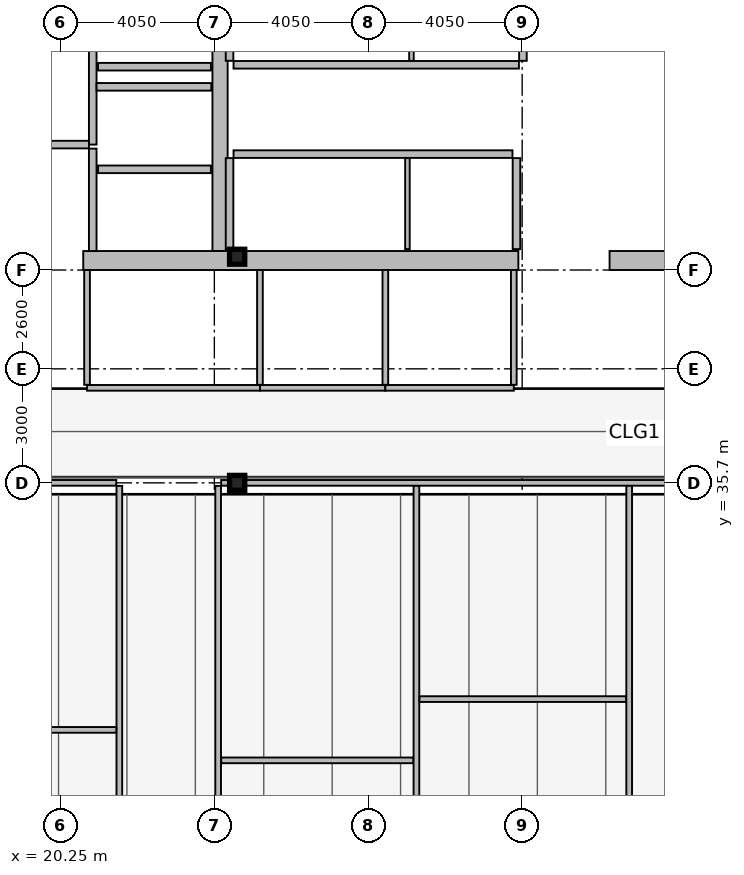
"""IFC4 building model, lengths in metres.
Left out: names, types, materials, properties, quantities, classifications, styles, units other than length and angle.
Written with IfcOpenShell. Run it as: python <this file> out.ifc"""

import sys

from ifc_helpers import new_model, si_unit, direction, frame, frame_2d, origin, origin_2d, place, context, subcontext, project, spatial, rectangle, i_section, extrude, element, fill, save


model = new_model("IFC4")
c1 = context("Model", 3, precision=1e-05, world=origin(), true_north=direction((0.0, 1.0)))
c2 = subcontext(c1, "Body", "Model", "MODEL_VIEW")
j1 = project(units=[si_unit("LENGTHUNIT", "METRE"), si_unit("PLANEANGLEUNIT", "RADIAN")], contexts=[c1])
p1 = place(None, origin())
s1 = spatial("IfcSite", under=j1, at=p1, CompositionType="ELEMENT")
p2 = place(p1, origin())
s2 = spatial("IfcBuilding", under=s1, at=p2, CompositionType="ELEMENT")
p3 = place(p2, frame((0.0, 0.0, 329.0)))
s3 = spatial("IfcBuildingStorey", under=s2, at=p3, CompositionType="ELEMENT", Elevation=329.0)
p4 = place(p3, frame((24.45, 41.8, 0.0), z_axis=(0.0, 0.0, 1.0), x_axis=(0.0, 1.0, 0.0)))
e1 = element("IfcWall", 1, at=p4, inside=s3, PredefinedType="SHEAR", context=c2, shape_type="SweptSolid", body=[
    extrude(rectangle(XDim=11.4, YDim=0.4, at=frame_2d((5.7, 0.0))), origin(), (0.0, 0.0, 1.0), 3.44),
])
p5 = place(p3, frame((32.3, 41.55, 0.0), z_axis=(0.0, 0.0, 1.0), x_axis=(-1.0, 0.0, 0.0)))
e2 = element("IfcWall", 2, at=p5, inside=s3, PredefinedType="SHEAR", context=c2, shape_type="SweptSolid", body=[
    extrude(rectangle(XDim=11.45, YDim=0.5, at=frame_2d((5.725, 0.0))), origin(), (0.0, 0.0, 1.0), 3.44),
])
p6 = place(p3, frame((38.45, 41.55, 0.0), z_axis=(0.0, 0.0, 1.0), x_axis=(-1.0, 0.0, 0.0)))
e3 = element("IfcWall", 3, at=p6, inside=s3, PredefinedType="SHEAR", context=c2, shape_type="SweptSolid", body=[
    extrude(rectangle(XDim=3.75, YDim=0.5, at=frame_2d((1.875, 0.0))), origin(), (0.0, 0.0, 1.0), 3.44),
])
for number, where, z_axis, x_axis in (
    (4, (24.9, 35.7, 0.0), (0.0, 0.0, 1.0), (1.0, 0.0, 0.0)),
    (5, (24.9, 41.65, 0.0), (0.0, 0.0, 1.0), (1.0, 0.0, 0.0)),
):
    element("IfcColumn", number, at=place(p3, frame(where, z_axis=z_axis, x_axis=x_axis)), inside=s3, PredefinedType="COLUMN", context=c2, shape_type="SweptSolid", body=[
        extrude(i_section(OverallWidth=0.399, OverallDepth=0.393, WebThickness=0.023, FlangeThickness=0.037, at=origin_2d()), origin(), (0.0, 0.0, 1.0), 3.6),
    ])
p7 = place(p3, frame((24.21, 43.95, 0.0), z_axis=(0.0, 0.0, 1.0), x_axis=(-1.0, 0.0, 0.0)))
e6 = element("IfcWall", 6, at=p7, inside=s3, PredefinedType="PARTITIONING", context=c2, shape_type="SweptSolid", body=[
    extrude(rectangle(XDim=2.97, YDim=0.2, at=frame_2d((1.485, 0.0))), origin(), (0.0, 0.0, 1.0), 3.44),
])
p8 = place(p7, frame((0.86, 0.0, 0.0)))
e7 = element("IfcOpeningElement", 7, at=p8, cuts=e6, PredefinedType="OPENING", context=c2, shape_type="SweptSolid", body=[
    extrude(rectangle(XDim=1.3, YDim=2.18, at=frame_2d((0.65, 1.09))), frame((0.0, 0.11, 0.0), z_axis=(0.0, -1.0, 0.0), x_axis=(1.0, 0.0, 0.0)), (0.0, 0.0, 1.0), 0.22),
])
p9 = place(p3, frame((24.21, 46.65, 0.0), z_axis=(0.0, 0.0, 1.0), x_axis=(-1.0, 0.0, 0.0)))
e8 = element("IfcWall", 8, at=p9, inside=s3, PredefinedType="PARTITIONING", context=c2, shape_type="SweptSolid", body=[
    extrude(rectangle(XDim=2.97, YDim=0.2, at=frame_2d((1.485, 0.0))), origin(), (0.0, 0.0, 1.0), 3.44),
])
p10 = place(p9, frame((0.91, 0.0, 0.0)))
e9 = element("IfcOpeningElement", 9, at=p10, cuts=e8, PredefinedType="OPENING", context=c2, shape_type="SweptSolid", body=[
    extrude(rectangle(XDim=1.2, YDim=2.18, at=frame_2d((0.6, 1.09))), frame((0.0, 0.11, 0.0), z_axis=(0.0, -1.0, 0.0), x_axis=(1.0, 0.0, 0.0)), (0.0, 0.0, 1.0), 0.22),
])
p11 = place(p3, frame((21.1, 44.6, 0.0), z_axis=(0.0, 0.0, 1.0), x_axis=(0.0, 1.0, 0.0)))
e10 = element("IfcWall", 10, at=p11, inside=s3, PredefinedType="PARTITIONING", context=c2, shape_type="SweptSolid", body=[
    extrude(rectangle(XDim=4.3, YDim=0.2, at=frame_2d((2.15, 0.0))), origin(), (0.0, 0.0, 1.0), 3.44),
])
p12 = place(p3, frame((16.7, 44.6, 0.0), z_axis=(0.0, 0.0, 1.0), x_axis=(1.0, 0.0, 0.0)))
e11 = element("IfcWall", 11, at=p12, inside=s3, PredefinedType="PARTITIONING", context=c2, shape_type="SweptSolid", body=[
    extrude(rectangle(XDim=4.3, YDim=0.2, at=frame_2d((2.15, 0.0))), origin(), (0.0, 0.0, 1.0), 3.44),
])
p13 = place(p12, frame((1.25, 0.0, 0.0)))
e12 = element("IfcOpeningElement", 12, at=p13, cuts=e11, PredefinedType="OPENING", context=c2, shape_type="SweptSolid", body=[
    extrude(rectangle(XDim=1.05, YDim=2.15, at=frame_2d((0.525, 1.075))), frame((0.0, 0.11, 0.0), z_axis=(0.0, -1.0, 0.0), x_axis=(1.0, 0.0, 0.0)), (0.0, 0.0, 1.0), 0.22),
])
p14 = place(p3, frame((21.2, 46.12, 0.0), z_axis=(0.0, 0.0, 1.0), x_axis=(1.0, 0.0, 0.0)))
e13 = element("IfcWall", 13, at=p14, inside=s3, PredefinedType="PARTITIONING", context=c2, shape_type="SweptSolid", body=[
    extrude(rectangle(XDim=3.02, YDim=0.2, at=frame_2d((1.51, 0.0))), origin(), (0.0, 0.0, 1.0), 3.44),
])
p15 = place(p3, frame((21.1, 41.8, 0.0), z_axis=(0.0, 0.0, 1.0), x_axis=(0.0, 1.0, 0.0)))
e14 = element("IfcWall", 14, at=p15, inside=s3, PredefinedType="PARTITIONING", context=c2, shape_type="SweptSolid", body=[
    extrude(rectangle(XDim=2.695, YDim=0.2, at=frame_2d((1.348, 0.0))), origin(), (0.0, 0.0, 1.0), 3.44),
])
p16 = place(p15, frame((0.38, 0.0, 0.0)))
e15 = element("IfcOpeningElement", 15, at=p16, cuts=e14, PredefinedType="OPENING", context=c2, shape_type="SweptSolid", body=[
    extrude(rectangle(XDim=1.05, YDim=2.15, at=frame_2d((0.525, 1.075))), frame((0.0, 0.11, 0.0), z_axis=(0.0, -1.0, 0.0), x_axis=(1.0, 0.0, 0.0)), (0.0, 0.0, 1.0), 0.22),
])
for number, where, z_axis, x_axis in (
    (16, (24.7, 46.805, 0.0), (0.0, 0.0, 1.0), (0.0, 1.0, 0.0)),
    (17, (32.42, 46.805, 0.0), (0.0, 0.0, 1.0), (0.0, 1.0, 0.0)),
):
    element("IfcWall", number, at=place(p3, frame(where, z_axis=z_axis, x_axis=x_axis)), inside=s3, PredefinedType="PARTITIONING", context=c2, shape_type="SweptSolid", body=[
        extrude(rectangle(XDim=5.99, YDim=0.2, at=frame_2d((2.995, 0.0))), origin(), (0.0, 0.0, 1.0), 3.44),
    ])
p17 = place(p3, frame((29.486, 46.805, 0.0), z_axis=(0.0, 0.0, 1.0), x_axis=(0.0, 1.0, 0.0)))
e18 = element("IfcWall", 18, at=p17, inside=s3, PredefinedType="PARTITIONING", context=c2, shape_type="SweptSolid", body=[
    extrude(rectangle(XDim=5.99, YDim=0.12, at=frame_2d((2.995, 0.0))), origin(), (0.0, 0.0, 1.0), 3.44),
])
p18 = place(p3, frame((24.805, 46.7, 0.0), z_axis=(0.0, 0.0, 1.0), x_axis=(1.0, 0.0, 0.0)))
e19 = element("IfcWall", 19, at=p18, inside=s3, PredefinedType="PARTITIONING", context=c2, shape_type="SweptSolid", body=[
    extrude(rectangle(XDim=7.51, YDim=0.2, at=frame_2d((3.755, 0.0))), origin(), (0.0, 0.0, 1.0), 3.44),
])
p19 = place(p18, frame((1.15, 0.0, 0.0)))
e20 = element("IfcOpeningElement", 20, at=p19, cuts=e19, PredefinedType="OPENING", context=c2, shape_type="SweptSolid", body=[
    extrude(rectangle(XDim=0.95, YDim=2.1, at=frame_2d((0.475, 1.05))), frame((0.0, 0.11, 0.0), z_axis=(0.0, -1.0, 0.0), x_axis=(1.0, 0.0, 0.0)), (0.0, 0.0, 1.0), 0.22),
])
p20 = place(p18, frame((5.336, 0.0, 0.0)))
e21 = element("IfcOpeningElement", 21, at=p20, cuts=e19, PredefinedType="OPENING", context=c2, shape_type="SweptSolid", body=[
    extrude(rectangle(XDim=0.95, YDim=2.1, at=frame_2d((0.475, 1.05))), frame((0.0, 0.11, 0.0), z_axis=(0.0, -1.0, 0.0), x_axis=(1.0, 0.0, 0.0)), (0.0, 0.0, 1.0), 0.22),
])
for number, where, z_axis, x_axis in (
    (22, (24.7, 41.85, 0.0), (0.0, 0.0, 1.0), (0.0, 1.0, 0.0)),
    (23, (32.25, 41.85, 0.0), (0.0, 0.0, 1.0), (0.0, 1.0, 0.0)),
):
    element("IfcWall", number, at=place(p3, frame(where, z_axis=z_axis, x_axis=x_axis)), inside=s3, PredefinedType="PARTITIONING", context=c2, shape_type="SweptSolid", body=[
        extrude(rectangle(XDim=2.395, YDim=0.2, at=frame_2d((1.198, 0.0))), origin(), (0.0, 0.0, 1.0), 3.44),
    ])
p21 = place(p3, frame((29.381, 41.85, 0.0), z_axis=(0.0, 0.0, 1.0), x_axis=(0.0, 1.0, 0.0)))
e24 = element("IfcWall", 24, at=p21, inside=s3, PredefinedType="PARTITIONING", context=c2, shape_type="SweptSolid", body=[
    extrude(rectangle(XDim=2.395, YDim=0.12, at=frame_2d((1.198, 0.0))), origin(), (0.0, 0.0, 1.0), 3.44),
])
p22 = place(p3, frame((24.805, 44.35, 0.0), z_axis=(0.0, 0.0, 1.0), x_axis=(1.0, 0.0, 0.0)))
e25 = element("IfcWall", 25, at=p22, inside=s3, PredefinedType="PARTITIONING", context=c2, shape_type="SweptSolid", body=[
    extrude(rectangle(XDim=7.34, YDim=0.2, at=frame_2d((3.67, 0.0))), origin(), (0.0, 0.0, 1.0), 3.44),
])
p23 = place(p22, frame((1.15, 0.0, 0.0)))
e26 = element("IfcOpeningElement", 26, at=p23, cuts=e25, PredefinedType="OPENING", context=c2, shape_type="SweptSolid", body=[
    extrude(rectangle(XDim=0.95, YDim=2.1, at=frame_2d((0.475, 1.05))), frame((0.0, 0.11, 0.0), z_axis=(0.0, -1.0, 0.0), x_axis=(1.0, 0.0, 0.0)), (0.0, 0.0, 1.0), 0.22),
])
p24 = place(p22, frame((5.231, 0.0, 0.0)))
e27 = element("IfcOpeningElement", 27, at=p24, cuts=e25, PredefinedType="OPENING", context=c2, shape_type="SweptSolid", body=[
    extrude(rectangle(XDim=0.95, YDim=2.1, at=frame_2d((0.475, 1.05))), frame((0.0, 0.11, 0.0), z_axis=(0.0, -1.0, 0.0), x_axis=(1.0, 0.0, 0.0)), (0.0, 0.0, 1.0), 0.22),
])
p25 = place(p3, frame((20.95, 38.2, 0.0), z_axis=(0.0, 0.0, 1.0), x_axis=(1.0, 0.0, 0.0)))
e28 = element("IfcWall", 28, at=p25, inside=s3, PredefinedType="PARTITIONING", context=c2, shape_type="SweptSolid", body=[
    extrude(rectangle(XDim=4.55, YDim=0.15, at=frame_2d((2.275, 0.0))), origin(), (0.0, 0.0, 1.0), 2.83),
])
p26 = place(p25, frame((0.9, 0.0, 0.0)))
e29 = element("IfcOpeningElement", 29, at=p26, cuts=e28, PredefinedType="OPENING", context=c2, shape_type="SweptSolid", body=[
    extrude(rectangle(XDim=0.95, YDim=2.05, at=frame_2d((0.475, 1.025))), frame((0.0, 0.085, 0.0), z_axis=(0.0, -1.0, 0.0), x_axis=(1.0, 0.0, 0.0)), (0.0, 0.0, 1.0), 0.17),
])
p27 = place(p3, frame((25.5, 38.2, 0.0), z_axis=(0.0, 0.0, 1.0), x_axis=(1.0, 0.0, 0.0)))
e30 = element("IfcWall", 30, at=p27, inside=s3, PredefinedType="PARTITIONING", context=c2, shape_type="SweptSolid", body=[
    extrude(rectangle(XDim=3.3, YDim=0.15, at=frame_2d((1.65, 0.0))), origin(), (0.0, 0.0, 1.0), 3.44),
])
p28 = place(p27, frame((0.9, 0.0, 0.0)))
e31 = element("IfcOpeningElement", 31, at=p28, cuts=e30, PredefinedType="OPENING", context=c2, shape_type="SweptSolid", body=[
    extrude(rectangle(XDim=0.95, YDim=2.05, at=frame_2d((0.475, 1.025))), frame((0.0, 0.085, 0.0), z_axis=(0.0, -1.0, 0.0), x_axis=(1.0, 0.0, 0.0)), (0.0, 0.0, 1.0), 0.17),
])
p29 = place(p3, frame((28.8, 38.2, 0.0), z_axis=(0.0, 0.0, 1.0), x_axis=(1.0, 0.0, 0.0)))
e32 = element("IfcWall", 32, at=p29, inside=s3, PredefinedType="PARTITIONING", context=c2, shape_type="SweptSolid", body=[
    extrude(rectangle(XDim=3.38, YDim=0.15, at=frame_2d((1.69, 0.0))), origin(), (0.0, 0.0, 1.0), 3.44),
])
p30 = place(p29, frame((0.7, 0.0, 0.0)))
e33 = element("IfcOpeningElement", 33, at=p30, cuts=e32, PredefinedType="OPENING", context=c2, shape_type="SweptSolid", body=[
    extrude(rectangle(XDim=0.95, YDim=2.05, at=frame_2d((0.475, 1.025))), frame((0.0, 0.085, 0.0), z_axis=(0.0, -1.0, 0.0), x_axis=(1.0, 0.0, 0.0)), (0.0, 0.0, 1.0), 0.17),
])
for number, where, z_axis, x_axis in (
    (34, (20.95, 38.28, 0.0), (0.0, 0.0, 1.0), (0.0, 1.0, 0.0)),
    (35, (25.5, 38.28, 0.0), (0.0, 0.0, 1.0), (0.0, 1.0, 0.0)),
    (36, (28.8, 38.28, 0.0), (0.0, 0.0, 1.0), (0.0, 1.0, 0.0)),
    (37, (32.18, 38.28, 0.0), (0.0, 0.0, 1.0), (0.0, 1.0, 0.0)),
):
    element("IfcWall", number, at=place(p3, frame(where, z_axis=z_axis, x_axis=x_axis)), inside=s3, PredefinedType="PARTITIONING", context=c2, shape_type="SweptSolid", body=[
        extrude(rectangle(XDim=3.02, YDim=0.15, at=frame_2d((1.51, 0.0))), origin(), (0.0, 0.0, 1.0), 3.44),
    ])
p31 = place(p3, frame((21.8, 10.665, 0.0), z_axis=(0.0, 0.0, 1.0), x_axis=(0.0, 1.0, 0.0)))
e38 = element("IfcWall", 38, at=p31, inside=s3, PredefinedType="PARTITIONING", context=c2, shape_type="SweptSolid", body=[
    extrude(rectangle(XDim=24.955, YDim=0.15, at=frame_2d((12.478, 0.0))), origin(), (0.0, 0.0, 1.0), 3.07),
])
p32 = place(p31, frame((4.2, 0.0, 0.0)))
e39 = element("IfcOpeningElement", 39, at=p32, cuts=e38, PredefinedType="OPENING", context=c2, shape_type="SweptSolid", body=[
    extrude(rectangle(XDim=1.1, YDim=2.1, at=frame_2d((0.55, 1.05))), frame((0.0, 0.085, 0.0), z_axis=(0.0, -1.0, 0.0), x_axis=(1.0, 0.0, 0.0)), (0.0, 0.0, 1.0), 0.17),
])
p33 = place(p3, frame((12.095, 35.7, 0.0), z_axis=(0.0, 0.0, 1.0), x_axis=(1.0, 0.0, 0.0)))
e40 = element("IfcWall", 40, at=p33, inside=s3, PredefinedType="PARTITIONING", context=c2, shape_type="SweptSolid", body=[
    extrude(rectangle(XDim=9.625, YDim=0.15, at=frame_2d((4.812, 0.0))), origin(), (0.0, 0.0, 1.0), 2.83),
])
p34 = place(p33, frame((2.8, 0.0, 0.0)))
e41 = element("IfcOpeningElement", 41, at=p34, cuts=e40, PredefinedType="OPENING", context=c2, shape_type="SweptSolid", body=[
    extrude(rectangle(XDim=1.0, YDim=2.05, at=frame_2d((0.5, 1.025))), frame((0.0, 0.085, 0.0), z_axis=(0.0, -1.0, 0.0), x_axis=(1.0, 0.0, 0.0)), (0.0, 0.0, 1.0), 0.17),
])
p35 = place(p3, frame((12.095, 29.2, 0.0), z_axis=(0.0, 0.0, 1.0), x_axis=(1.0, 0.0, 0.0)))
e42 = element("IfcWall", 42, at=p35, inside=s3, PredefinedType="PARTITIONING", context=c2, shape_type="SweptSolid", body=[
    extrude(rectangle(XDim=9.625, YDim=0.15, at=frame_2d((4.812, 0.0))), origin(), (0.0, 0.0, 1.0), 2.83),
])
p36 = place(p35, frame((2.2, 0.0, 0.0)))
e43 = element("IfcOpeningElement", 43, at=p36, cuts=e42, PredefinedType="OPENING", context=c2, shape_type="SweptSolid", body=[
    extrude(rectangle(XDim=0.9, YDim=2.05, at=frame_2d((0.45, 1.025))), frame((0.0, 0.085, 0.0), z_axis=(0.0, -1.0, 0.0), x_axis=(1.0, 0.0, 0.0)), (0.0, 0.0, 1.0), 0.17),
])
p37 = place(p3, frame((24.4, 22.785, 0.0), z_axis=(0.0, 0.0, 1.0), x_axis=(0.0, 1.0, 0.0)))
e44 = element("IfcWall", 44, at=p37, inside=s3, PredefinedType="PARTITIONING", context=c2, shape_type="SweptSolid", body=[
    extrude(rectangle(XDim=12.835, YDim=0.15, at=frame_2d((6.417, 0.0))), origin(), (0.0, 0.0, 1.0), 2.83),
])
p38 = place(p3, frame((24.48, 35.7, 0.0), z_axis=(0.0, 0.0, 1.0), x_axis=(1.0, 0.0, 0.0)))
e45 = element("IfcWall", 45, at=p38, inside=s3, PredefinedType="PARTITIONING", context=c2, shape_type="SweptSolid", body=[
    extrude(rectangle(XDim=25.02, YDim=0.15, at=frame_2d((12.51, 0.0))), origin(), (0.0, 0.0, 1.0), 2.83),
])
p39 = place(p3, frame((24.48, 28.398, 0.0), z_axis=(0.0, 0.0, 1.0), x_axis=(1.0, 0.0, 0.0)))
e46 = element("IfcWall", 46, at=p39, inside=s3, PredefinedType="PARTITIONING", context=c2, shape_type="SweptSolid", body=[
    extrude(rectangle(XDim=5.058, YDim=0.15, at=frame_2d((2.529, 0.0))), origin(), (0.0, 0.0, 1.0), 2.83),
])
p40 = place(p39, frame((2.348, 0.0, 0.0)))
e47 = element("IfcOpeningElement", 47, at=p40, cuts=e46, PredefinedType="OPENING", context=c2, shape_type="SweptSolid", body=[
    extrude(rectangle(XDim=0.9, YDim=2.05, at=frame_2d((0.45, 1.025))), frame((0.0, 0.085, 0.0), z_axis=(0.0, -1.0, 0.0), x_axis=(1.0, 0.0, 0.0)), (0.0, 0.0, 1.0), 0.17),
])
p41 = place(p3, frame((29.618, 22.785, 0.0), z_axis=(0.0, 0.0, 1.0), x_axis=(0.0, 1.0, 0.0)))
e48 = element("IfcWall", 48, at=p41, inside=s3, PredefinedType="PARTITIONING", context=c2, shape_type="SweptSolid", body=[
    extrude(rectangle(XDim=12.835, YDim=0.15, at=frame_2d((6.417, 0.0))), origin(), (0.0, 0.0, 1.0), 3.07),
])
p42 = place(p3, frame((29.698, 30.01, 0.0), z_axis=(0.0, 0.0, 1.0), x_axis=(1.0, 0.0, 0.0)))
e49 = element("IfcWall", 49, at=p42, inside=s3, PredefinedType="PARTITIONING", context=c2, shape_type="SweptSolid", body=[
    extrude(rectangle(XDim=5.438, YDim=0.15, at=frame_2d((2.719, 0.0))), origin(), (0.0, 0.0, 1.0), 3.44),
])
p43 = place(p42, frame((2.519, 0.0, 0.0)))
e50 = element("IfcOpeningElement", 50, at=p43, cuts=e49, PredefinedType="OPENING", context=c2, shape_type="SweptSolid", body=[
    extrude(rectangle(XDim=0.9, YDim=2.05, at=frame_2d((0.45, 1.025))), frame((0.0, 0.085, 0.0), z_axis=(0.0, -1.0, 0.0), x_axis=(1.0, 0.0, 0.0)), (0.0, 0.0, 1.0), 0.17),
])
p44 = place(p3, frame((35.216, 22.785, 0.0), z_axis=(0.0, 0.0, 1.0), x_axis=(0.0, 1.0, 0.0)))
e51 = element("IfcWall", 51, at=p44, inside=s3, PredefinedType="PARTITIONING", context=c2, shape_type="SweptSolid", body=[
    extrude(rectangle(XDim=12.835, YDim=0.15, at=frame_2d((6.417, 0.0))), origin(), (0.0, 0.0, 1.0), 3.07),
])
p45 = place(p8, origin())
e52 = element("IfcDoor", 52, at=p45, inside=s3, OperationType="SLIDING_TO_LEFT", PredefinedType="DOOR", context=c2, shape_type="SweptSolid", body=[
    extrude(rectangle(XDim=1.3, YDim=2.18, at=frame_2d((0.65, 1.09))), frame((0.0, 0.025, 0.0), z_axis=(0.0, -1.0, 0.0), x_axis=(1.0, 0.0, 0.0)), (0.0, 0.0, 1.0), 0.05),
])
fill(e7, e52)
p46 = place(p10, origin())
e53 = element("IfcDoor", 53, at=p46, inside=s3, OperationType="SLIDING_TO_LEFT", PredefinedType="DOOR", context=c2, shape_type="SweptSolid", body=[
    extrude(rectangle(XDim=1.2, YDim=2.18, at=frame_2d((0.6, 1.09))), frame((0.0, 0.025, 0.0), z_axis=(0.0, -1.0, 0.0), x_axis=(1.0, 0.0, 0.0)), (0.0, 0.0, 1.0), 0.05),
])
fill(e9, e53)
p47 = place(p16, origin())
e54 = element("IfcDoor", 54, at=p47, inside=s3, OperationType="SINGLE_SWING_LEFT", PredefinedType="DOOR", context=c2, shape_type="SweptSolid", body=[
    extrude(rectangle(XDim=1.05, YDim=2.15, at=frame_2d((0.525, 1.075))), frame((0.0, 0.025, 0.0), z_axis=(0.0, -1.0, 0.0), x_axis=(1.0, 0.0, 0.0)), (0.0, 0.0, 1.0), 0.05),
])
fill(e15, e54)
p48 = place(p19, origin())
e55 = element("IfcDoor", 55, at=p48, inside=s3, OperationType="SINGLE_SWING_RIGHT", PredefinedType="DOOR", context=c2, shape_type="SweptSolid", body=[
    extrude(rectangle(XDim=0.95, YDim=2.1, at=frame_2d((0.475, 1.05))), frame((0.0, 0.025, 0.0), z_axis=(0.0, -1.0, 0.0), x_axis=(1.0, 0.0, 0.0)), (0.0, 0.0, 1.0), 0.05),
])
fill(e20, e55)
p49 = place(p20, origin())
e56 = element("IfcDoor", 56, at=p49, inside=s3, OperationType="SINGLE_SWING_LEFT", PredefinedType="DOOR", context=c2, shape_type="SweptSolid", body=[
    extrude(rectangle(XDim=0.95, YDim=2.1, at=frame_2d((0.475, 1.05))), frame((0.0, 0.025, 0.0), z_axis=(0.0, -1.0, 0.0), x_axis=(1.0, 0.0, 0.0)), (0.0, 0.0, 1.0), 0.05),
])
fill(e21, e56)
p50 = place(p23, origin())
e57 = element("IfcDoor", 57, at=p50, inside=s3, OperationType="SINGLE_SWING_RIGHT", PredefinedType="DOOR", context=c2, shape_type="SweptSolid", body=[
    extrude(rectangle(XDim=0.95, YDim=2.1, at=frame_2d((0.475, 1.05))), frame((0.0, 0.025, 0.0), z_axis=(0.0, -1.0, 0.0), x_axis=(1.0, 0.0, 0.0)), (0.0, 0.0, 1.0), 0.05),
])
fill(e26, e57)
p51 = place(p24, origin())
e58 = element("IfcDoor", 58, at=p51, inside=s3, OperationType="SINGLE_SWING_LEFT", PredefinedType="DOOR", context=c2, shape_type="SweptSolid", body=[
    extrude(rectangle(XDim=0.95, YDim=2.1, at=frame_2d((0.475, 1.05))), frame((0.0, 0.025, 0.0), z_axis=(0.0, -1.0, 0.0), x_axis=(1.0, 0.0, 0.0)), (0.0, 0.0, 1.0), 0.05),
])
fill(e27, e58)
p52 = place(p26, origin())
e59 = element("IfcDoor", 59, at=p52, inside=s3, OperationType="SINGLE_SWING_RIGHT", PredefinedType="DOOR", context=c2, shape_type="SweptSolid", body=[
    extrude(rectangle(XDim=0.95, YDim=2.05, at=frame_2d((0.475, 1.025))), frame((0.0, 0.025, 0.0), z_axis=(0.0, -1.0, 0.0), x_axis=(1.0, 0.0, 0.0)), (0.0, 0.0, 1.0), 0.05),
])
fill(e29, e59)
p53 = place(p28, origin())
e60 = element("IfcDoor", 60, at=p53, inside=s3, OperationType="SINGLE_SWING_LEFT", PredefinedType="DOOR", context=c2, shape_type="SweptSolid", body=[
    extrude(rectangle(XDim=0.95, YDim=2.05, at=frame_2d((0.475, 1.025))), frame((0.0, 0.025, 0.0), z_axis=(0.0, -1.0, 0.0), x_axis=(1.0, 0.0, 0.0)), (0.0, 0.0, 1.0), 0.05),
])
fill(e31, e60)
p54 = place(p30, origin())
e61 = element("IfcDoor", 61, at=p54, inside=s3, OperationType="SINGLE_SWING_RIGHT", PredefinedType="DOOR", context=c2, shape_type="SweptSolid", body=[
    extrude(rectangle(XDim=0.95, YDim=2.05, at=frame_2d((0.475, 1.025))), frame((0.0, 0.025, 0.0), z_axis=(0.0, -1.0, 0.0), x_axis=(1.0, 0.0, 0.0)), (0.0, 0.0, 1.0), 0.05),
])
fill(e33, e61)
p55 = place(p40, origin())
e62 = element("IfcDoor", 62, at=p55, inside=s3, OperationType="SINGLE_SWING_RIGHT", PredefinedType="DOOR", context=c2, shape_type="SweptSolid", body=[
    extrude(rectangle(XDim=0.9, YDim=2.05, at=frame_2d((0.45, 1.025))), frame((0.0, 0.025, 0.0), z_axis=(0.0, -1.0, 0.0), x_axis=(1.0, 0.0, 0.0)), (0.0, 0.0, 1.0), 0.05),
])
fill(e47, e62)
p56 = place(p43, origin())
e63 = element("IfcDoor", 63, at=p56, inside=s3, OperationType="SINGLE_SWING_RIGHT", PredefinedType="DOOR", context=c2, shape_type="SweptSolid", body=[
    extrude(rectangle(XDim=0.9, YDim=2.05, at=frame_2d((0.45, 1.025))), frame((0.0, 0.025, 0.0), z_axis=(0.0, -1.0, 0.0), x_axis=(1.0, 0.0, 0.0)), (0.0, 0.0, 1.0), 0.05),
])
fill(e50, e63)
save(model, sys.argv[1])
